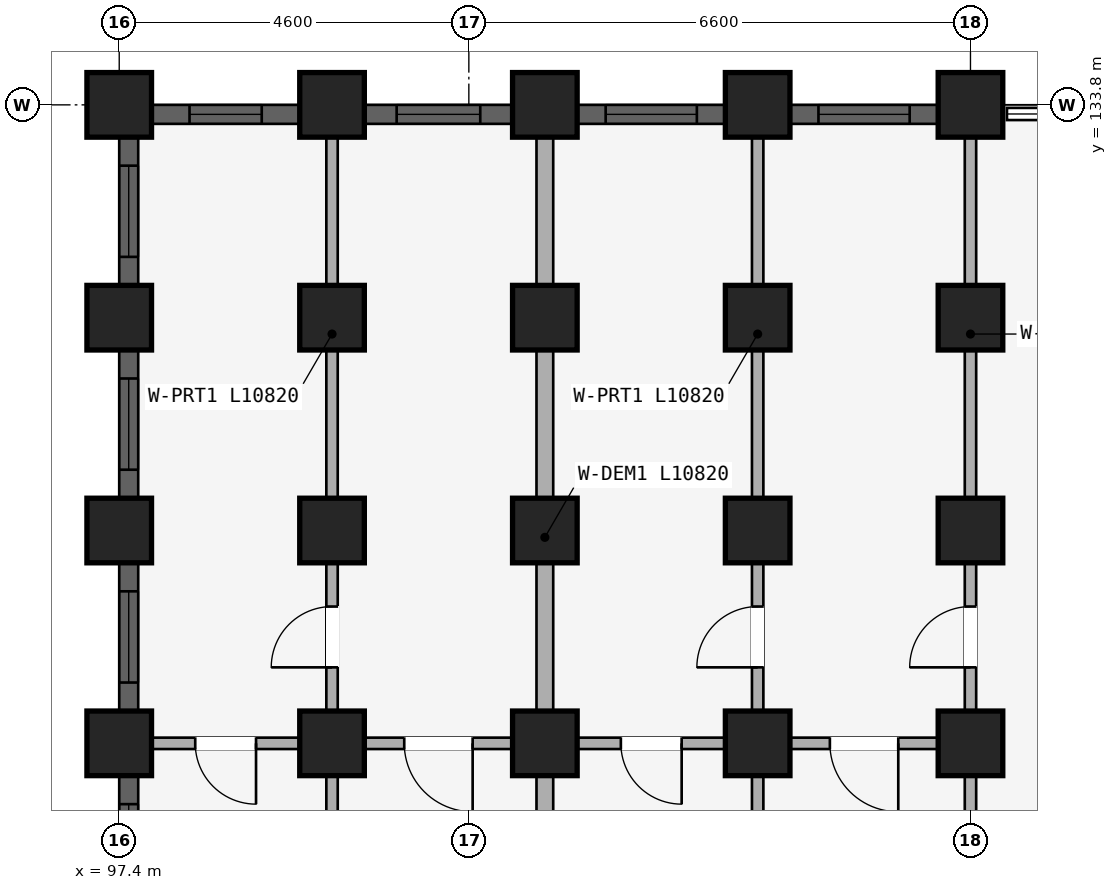
"""IFC4 building model, lengths in metres.
Left out: names, types, materials, properties, quantities, classifications, styles, units other than length and angle.
Written with IfcOpenShell. Run it as: python <this file> out.ifc"""

import sys

from ifc_helpers import new_model, si_unit, direction, frame, frame_2d, origin, origin_2d, place, context, subcontext, project, spatial, rectangle, extrude, element, fill, save


model = new_model("IFC4")
c1 = context("Model", 3, precision=1e-05, world=origin(), true_north=direction((0.0, 1.0)))
c2 = subcontext(c1, "Body", "Model", "MODEL_VIEW")
j1 = project(units=[si_unit("LENGTHUNIT", "METRE"), si_unit("PLANEANGLEUNIT", "RADIAN")], contexts=[c1])
p1 = place(None, origin())
s1 = spatial("IfcSite", under=j1, at=p1, CompositionType="ELEMENT")
p2 = place(p1, origin())
s2 = spatial("IfcBuilding", under=s1, at=p2, CompositionType="ELEMENT")
p3 = place(p2, frame((0.0, 0.0, 4.5)))
s3 = spatial("IfcBuildingStorey", under=s2, at=p3, CompositionType="ELEMENT", Elevation=4.5)
for number, where, z_axis, x_axis in (
    (1, (108.6, 125.4, 0.0), (0.0, 0.0, 1.0), (1.0, 0.0, 0.0)),
    (2, (108.6, 128.2, 0.0), (0.0, 0.0, 1.0), (1.0, 0.0, 0.0)),
    (3, (108.6, 131.0, 0.0), (0.0, 0.0, 1.0), (1.0, 0.0, 0.0)),
    (4, (108.6, 133.8, 0.0), (0.0, 0.0, 1.0), (1.0, 0.0, 0.0)),
    (5, (105.8, 125.4, 0.0), (0.0, 0.0, 1.0), (1.0, 0.0, 0.0)),
    (6, (105.8, 128.2, 0.0), (0.0, 0.0, 1.0), (1.0, 0.0, 0.0)),
    (7, (105.8, 131.0, 0.0), (0.0, 0.0, 1.0), (1.0, 0.0, 0.0)),
    (8, (105.8, 133.8, 0.0), (0.0, 0.0, 1.0), (1.0, 0.0, 0.0)),
    (9, (103.0, 125.4, 0.0), (0.0, 0.0, 1.0), (1.0, 0.0, 0.0)),
    (10, (103.0, 128.2, 0.0), (0.0, 0.0, 1.0), (1.0, 0.0, 0.0)),
    (11, (103.0, 131.0, 0.0), (0.0, 0.0, 1.0), (1.0, 0.0, 0.0)),
    (12, (103.0, 133.8, 0.0), (0.0, 0.0, 1.0), (1.0, 0.0, 0.0)),
    (13, (100.2, 125.4, 0.0), (0.0, 0.0, 1.0), (1.0, 0.0, 0.0)),
    (14, (100.2, 128.2, 0.0), (0.0, 0.0, 1.0), (1.0, 0.0, 0.0)),
    (15, (100.2, 131.0, 0.0), (0.0, 0.0, 1.0), (1.0, 0.0, 0.0)),
    (16, (100.2, 133.8, 0.0), (0.0, 0.0, 1.0), (1.0, 0.0, 0.0)),
    (17, (97.4, 125.4, 0.0), (0.0, 0.0, 1.0), (1.0, 0.0, 0.0)),
    (18, (97.4, 128.2, 0.0), (0.0, 0.0, 1.0), (1.0, 0.0, 0.0)),
    (19, (97.4, 131.0, 0.0), (0.0, 0.0, 1.0), (1.0, 0.0, 0.0)),
    (20, (97.4, 133.8, 0.0), (0.0, 0.0, 1.0), (1.0, 0.0, 0.0)),
):
    element("IfcColumn", number, at=place(p3, frame(where, z_axis=z_axis, x_axis=x_axis)), inside=s3, PredefinedType="COLUMN", context=c2, shape_type="SweptSolid", body=[
        extrude(rectangle(XDim=0.85, YDim=0.85, at=origin_2d()), origin(), (0.0, 0.0, 1.0), 3.98),
    ])
p4 = place(p3, frame((108.52, 125.4, 0.0), z_axis=(0.0, 0.0, 1.0), x_axis=(-1.0, 0.0, 0.0)))
e21 = element("IfcWall", 21, at=p4, inside=s3, PredefinedType="PLUMBINGWALL", context=c2, shape_type="SweptSolid", body=[
    extrude(rectangle(XDim=2.64, YDim=0.15, at=frame_2d((1.32, 0.0))), origin(), (0.0, 0.0, 1.0), 3.322),
])
p5 = place(p4, frame((0.87, 0.0, 0.0)))
e22 = element("IfcOpeningElement", 22, at=p5, cuts=e21, PredefinedType="OPENING", context=c2, shape_type="SweptSolid", body=[
    extrude(rectangle(XDim=0.9, YDim=2.1, at=frame_2d((0.45, 1.05))), frame((0.0, 0.085, 0.0), z_axis=(0.0, -1.0, 0.0), x_axis=(1.0, 0.0, 0.0)), (0.0, 0.0, 1.0), 0.17),
])
p6 = place(p3, frame((105.72, 125.4, 0.0), z_axis=(0.0, 0.0, 1.0), x_axis=(-1.0, 0.0, 0.0)))
e23 = element("IfcWall", 23, at=p6, inside=s3, PredefinedType="PLUMBINGWALL", context=c2, shape_type="SweptSolid", body=[
    extrude(rectangle(XDim=2.64, YDim=0.15, at=frame_2d((1.32, 0.0))), origin(), (0.0, 0.0, 1.0), 3.322),
])
p7 = place(p6, frame((0.92, 0.0, 0.0)))
e24 = element("IfcOpeningElement", 24, at=p7, cuts=e23, PredefinedType="OPENING", context=c2, shape_type="SweptSolid", body=[
    extrude(rectangle(XDim=0.8, YDim=2.1, at=frame_2d((0.4, 1.05))), frame((0.0, 0.085, 0.0), z_axis=(0.0, -1.0, 0.0), x_axis=(1.0, 0.0, 0.0)), (0.0, 0.0, 1.0), 0.17),
])
p8 = place(p3, frame((102.92, 125.4, 0.0), z_axis=(0.0, 0.0, 1.0), x_axis=(-1.0, 0.0, 0.0)))
e25 = element("IfcWall", 25, at=p8, inside=s3, PredefinedType="PLUMBINGWALL", context=c2, shape_type="SweptSolid", body=[
    extrude(rectangle(XDim=2.64, YDim=0.15, at=frame_2d((1.32, 0.0))), origin(), (0.0, 0.0, 1.0), 3.322),
])
p9 = place(p8, frame((0.87, 0.0, 0.0)))
e26 = element("IfcOpeningElement", 26, at=p9, cuts=e25, PredefinedType="OPENING", context=c2, shape_type="SweptSolid", body=[
    extrude(rectangle(XDim=0.9, YDim=2.1, at=frame_2d((0.45, 1.05))), frame((0.0, 0.085, 0.0), z_axis=(0.0, -1.0, 0.0), x_axis=(1.0, 0.0, 0.0)), (0.0, 0.0, 1.0), 0.17),
])
p10 = place(p3, frame((100.12, 125.4, 0.0), z_axis=(0.0, 0.0, 1.0), x_axis=(-1.0, 0.0, 0.0)))
e27 = element("IfcWall", 27, at=p10, inside=s3, PredefinedType="PLUMBINGWALL", context=c2, shape_type="SweptSolid", body=[
    extrude(rectangle(XDim=2.64, YDim=0.15, at=frame_2d((1.32, 0.0))), origin(), (0.0, 0.0, 1.0), 3.322),
])
p11 = place(p10, frame((0.92, 0.0, 0.0)))
e28 = element("IfcOpeningElement", 28, at=p11, cuts=e27, PredefinedType="OPENING", context=c2, shape_type="SweptSolid", body=[
    extrude(rectangle(XDim=0.8, YDim=2.1, at=frame_2d((0.4, 1.05))), frame((0.0, 0.085, 0.0), z_axis=(0.0, -1.0, 0.0), x_axis=(1.0, 0.0, 0.0)), (0.0, 0.0, 1.0), 0.17),
])
p12 = place(p3, frame((108.6, 122.7, 0.0), z_axis=(0.0, 0.0, 1.0), x_axis=(0.0, 1.0, 0.0)))
e29 = element("IfcWall", 29, at=p12, inside=s3, PredefinedType="PARTITIONING", context=c2, shape_type="SweptSolid", body=[
    extrude(rectangle(XDim=10.82, YDim=0.15, at=frame_2d((5.41, 0.0))), origin(), (0.0, 0.0, 1.0), 3.322),
])
p13 = place(p12, frame((3.7, 0.0, 0.0)))
e30 = element("IfcOpeningElement", 30, at=p13, cuts=e29, PredefinedType="OPENING", context=c2, shape_type="SweptSolid", body=[
    extrude(rectangle(XDim=0.8, YDim=2.1, at=frame_2d((0.4, 1.05))), frame((0.0, 0.085, 0.0), z_axis=(0.0, -1.0, 0.0), x_axis=(1.0, 0.0, 0.0)), (0.0, 0.0, 1.0), 0.17),
])
p14 = place(p3, frame((105.8, 122.7, 0.0), z_axis=(0.0, 0.0, 1.0), x_axis=(0.0, 1.0, 0.0)))
e31 = element("IfcWall", 31, at=p14, inside=s3, PredefinedType="PARTITIONING", context=c2, shape_type="SweptSolid", body=[
    extrude(rectangle(XDim=10.82, YDim=0.15, at=frame_2d((5.41, 0.0))), origin(), (0.0, 0.0, 1.0), 3.322),
])
p15 = place(p14, frame((3.7, 0.0, 0.0)))
e32 = element("IfcOpeningElement", 32, at=p15, cuts=e31, PredefinedType="OPENING", context=c2, shape_type="SweptSolid", body=[
    extrude(rectangle(XDim=0.8, YDim=2.1, at=frame_2d((0.4, 1.05))), frame((0.0, 0.085, 0.0), z_axis=(0.0, -1.0, 0.0), x_axis=(1.0, 0.0, 0.0)), (0.0, 0.0, 1.0), 0.17),
])
p16 = place(p3, frame((103.0, 122.7, 0.0), z_axis=(0.0, 0.0, 1.0), x_axis=(0.0, 1.0, 0.0)))
e33 = element("IfcWall", 33, at=p16, inside=s3, PredefinedType="STANDARD", context=c2, shape_type="SweptSolid", body=[
    extrude(rectangle(XDim=10.82, YDim=0.22, at=frame_2d((5.41, 0.0))), origin(), (0.0, 0.0, 1.0), 3.322),
])
p17 = place(p3, frame((100.2, 122.7, 0.0), z_axis=(0.0, 0.0, 1.0), x_axis=(0.0, 1.0, 0.0)))
e34 = element("IfcWall", 34, at=p17, inside=s3, PredefinedType="PARTITIONING", context=c2, shape_type="SweptSolid", body=[
    extrude(rectangle(XDim=10.82, YDim=0.15, at=frame_2d((5.41, 0.0))), origin(), (0.0, 0.0, 1.0), 3.322),
])
p18 = place(p17, frame((3.7, 0.0, 0.0)))
e35 = element("IfcOpeningElement", 35, at=p18, cuts=e34, PredefinedType="OPENING", context=c2, shape_type="SweptSolid", body=[
    extrude(rectangle(XDim=0.8, YDim=2.1, at=frame_2d((0.4, 1.05))), frame((0.0, 0.085, 0.0), z_axis=(0.0, -1.0, 0.0), x_axis=(1.0, 0.0, 0.0)), (0.0, 0.0, 1.0), 0.17),
])
p19 = place(p3, frame((108.171, 133.675, 0.0), z_axis=(0.0, 0.0, 1.0), x_axis=(-1.0, 0.0, 0.0)))
e36 = element("IfcWall", 36, at=p19, inside=s3, PredefinedType="STANDARD", context=c2, shape_type="SweptSolid", body=[
    extrude(rectangle(XDim=1.943, YDim=0.25, at=frame_2d((0.971, 0.0))), origin(), (0.0, 0.0, 1.0), 3.522),
])
p20 = place(p19, frame((0.372, 0.0, 0.88)))
e37 = element("IfcOpeningElement", 37, at=p20, cuts=e36, PredefinedType="OPENING", context=c2, shape_type="SweptSolid", body=[
    extrude(rectangle(XDim=1.2, YDim=1.5, at=frame_2d((0.6, 0.75))), frame((0.0, 0.135, 0.0), z_axis=(0.0, -1.0, 0.0), x_axis=(1.0, 0.0, 0.0)), (0.0, 0.0, 1.0), 0.27),
])
p21 = place(p3, frame((105.372, 133.675, 0.0), z_axis=(0.0, 0.0, 1.0), x_axis=(-1.0, 0.0, 0.0)))
e38 = element("IfcWall", 38, at=p21, inside=s3, PredefinedType="STANDARD", context=c2, shape_type="SweptSolid", body=[
    extrude(rectangle(XDim=1.943, YDim=0.25, at=frame_2d((0.972, 0.0))), origin(), (0.0, 0.0, 1.0), 3.522),
])
p22 = place(p21, frame((0.372, 0.0, 0.88)))
e39 = element("IfcOpeningElement", 39, at=p22, cuts=e38, PredefinedType="OPENING", context=c2, shape_type="SweptSolid", body=[
    extrude(rectangle(XDim=1.2, YDim=1.5, at=frame_2d((0.6, 0.75))), frame((0.0, 0.135, 0.0), z_axis=(0.0, -1.0, 0.0), x_axis=(1.0, 0.0, 0.0)), (0.0, 0.0, 1.0), 0.27),
])
p23 = place(p3, frame((102.572, 133.675, 0.0), z_axis=(0.0, 0.0, 1.0), x_axis=(-1.0, 0.0, 0.0)))
e40 = element("IfcWall", 40, at=p23, inside=s3, PredefinedType="STANDARD", context=c2, shape_type="SweptSolid", body=[
    extrude(rectangle(XDim=1.943, YDim=0.25, at=frame_2d((0.972, 0.0))), origin(), (0.0, 0.0, 1.0), 3.522),
])
p24 = place(p23, frame((0.421, 0.0, 0.88)))
e41 = element("IfcOpeningElement", 41, at=p24, cuts=e40, PredefinedType="OPENING", context=c2, shape_type="SweptSolid", body=[
    extrude(rectangle(XDim=1.1, YDim=1.45, at=frame_2d((0.55, 0.725))), frame((0.0, 0.135, 0.0), z_axis=(0.0, -1.0, 0.0), x_axis=(1.0, 0.0, 0.0)), (0.0, 0.0, 1.0), 0.27),
])
p25 = place(p3, frame((99.771, 133.675, 0.0), z_axis=(0.0, 0.0, 1.0), x_axis=(-1.0, 0.0, 0.0)))
e42 = element("IfcWall", 42, at=p25, inside=s3, PredefinedType="STANDARD", context=c2, shape_type="SweptSolid", body=[
    extrude(rectangle(XDim=1.943, YDim=0.25, at=frame_2d((0.971, 0.0))), origin(), (0.0, 0.0, 1.0), 3.522),
])
p26 = place(p25, frame((0.497, 0.0, 0.88)))
e43 = element("IfcOpeningElement", 43, at=p26, cuts=e42, PredefinedType="OPENING", context=c2, shape_type="SweptSolid", body=[
    extrude(rectangle(XDim=0.95, YDim=1.35, at=frame_2d((0.475, 0.675))), frame((0.0, 0.135, 0.0), z_axis=(0.0, -1.0, 0.0), x_axis=(1.0, 0.0, 0.0)), (0.0, 0.0, 1.0), 0.27),
])
p27 = place(p3, frame((97.525, 123.02, 0.0), z_axis=(0.0, 0.0, 1.0), x_axis=(0.0, 1.0, 0.0)))
e44 = element("IfcWall", 44, at=p27, inside=s3, PredefinedType="STANDARD", context=c2, shape_type="SweptSolid", body=[
    extrude(rectangle(XDim=1.96, YDim=0.25, at=frame_2d((0.98, 0.0))), origin(), (0.0, 0.0, 1.0), 3.322),
])
p28 = place(p27, frame((0.38, 0.0, 0.88)))
e45 = element("IfcOpeningElement", 45, at=p28, cuts=e44, PredefinedType="OPENING", context=c2, shape_type="SweptSolid", body=[
    extrude(rectangle(XDim=1.2, YDim=1.5, at=frame_2d((0.6, 0.75))), frame((0.0, 0.135, 0.0), z_axis=(0.0, -1.0, 0.0), x_axis=(1.0, 0.0, 0.0)), (0.0, 0.0, 1.0), 0.27),
])
p29 = place(p3, frame((97.525, 125.82, 0.0), z_axis=(0.0, 0.0, 1.0), x_axis=(0.0, 1.0, 0.0)))
e46 = element("IfcWall", 46, at=p29, inside=s3, PredefinedType="STANDARD", context=c2, shape_type="SweptSolid", body=[
    extrude(rectangle(XDim=1.96, YDim=0.25, at=frame_2d((0.98, 0.0))), origin(), (0.0, 0.0, 1.0), 3.322),
])
p30 = place(p29, frame((0.38, 0.0, 0.88)))
e47 = element("IfcOpeningElement", 47, at=p30, cuts=e46, PredefinedType="OPENING", context=c2, shape_type="SweptSolid", body=[
    extrude(rectangle(XDim=1.2, YDim=1.5, at=frame_2d((0.6, 0.75))), frame((0.0, 0.135, 0.0), z_axis=(0.0, -1.0, 0.0), x_axis=(1.0, 0.0, 0.0)), (0.0, 0.0, 1.0), 0.27),
])
p31 = place(p3, frame((97.525, 128.62, 0.0), z_axis=(0.0, 0.0, 1.0), x_axis=(0.0, 1.0, 0.0)))
e48 = element("IfcWall", 48, at=p31, inside=s3, PredefinedType="STANDARD", context=c2, shape_type="SweptSolid", body=[
    extrude(rectangle(XDim=1.96, YDim=0.25, at=frame_2d((0.98, 0.0))), origin(), (0.0, 0.0, 1.0), 3.322),
])
p32 = place(p31, frame((0.38, 0.0, 0.88)))
e49 = element("IfcOpeningElement", 49, at=p32, cuts=e48, PredefinedType="OPENING", context=c2, shape_type="SweptSolid", body=[
    extrude(rectangle(XDim=1.2, YDim=1.5, at=frame_2d((0.6, 0.75))), frame((0.0, 0.135, 0.0), z_axis=(0.0, -1.0, 0.0), x_axis=(1.0, 0.0, 0.0)), (0.0, 0.0, 1.0), 0.27),
])
p33 = place(p3, frame((97.525, 131.42, 0.0), z_axis=(0.0, 0.0, 1.0), x_axis=(0.0, 1.0, 0.0)))
e50 = element("IfcWall", 50, at=p33, inside=s3, PredefinedType="STANDARD", context=c2, shape_type="SweptSolid", body=[
    extrude(rectangle(XDim=1.96, YDim=0.25, at=frame_2d((0.98, 0.0))), origin(), (0.0, 0.0, 1.0), 3.322),
])
p34 = place(p33, frame((0.38, 0.0, 0.88)))
e51 = element("IfcOpeningElement", 51, at=p34, cuts=e50, PredefinedType="OPENING", context=c2, shape_type="SweptSolid", body=[
    extrude(rectangle(XDim=1.2, YDim=1.5, at=frame_2d((0.6, 0.75))), frame((0.0, 0.135, 0.0), z_axis=(0.0, -1.0, 0.0), x_axis=(1.0, 0.0, 0.0)), (0.0, 0.0, 1.0), 0.27),
])
p35 = place(p20, origin())
e52 = element("IfcWindow", 52, at=p35, inside=s3, PartitioningType="SINGLE_PANEL", PredefinedType="WINDOW", context=c2, shape_type="SweptSolid", body=[
    extrude(rectangle(XDim=1.2, YDim=1.5, at=frame_2d((0.6, 0.75))), frame((0.0, 0.03, 0.0), z_axis=(0.0, -1.0, 0.0), x_axis=(1.0, 0.0, 0.0)), (0.0, 0.0, 1.0), 0.06),
])
fill(e37, e52)
p36 = place(p22, origin())
e53 = element("IfcWindow", 53, at=p36, inside=s3, PartitioningType="SINGLE_PANEL", PredefinedType="WINDOW", context=c2, shape_type="SweptSolid", body=[
    extrude(rectangle(XDim=1.2, YDim=1.5, at=frame_2d((0.6, 0.75))), frame((0.0, 0.03, 0.0), z_axis=(0.0, -1.0, 0.0), x_axis=(1.0, 0.0, 0.0)), (0.0, 0.0, 1.0), 0.06),
])
fill(e39, e53)
p37 = place(p24, origin())
e54 = element("IfcWindow", 54, at=p37, inside=s3, PartitioningType="SINGLE_PANEL", PredefinedType="WINDOW", context=c2, shape_type="SweptSolid", body=[
    extrude(rectangle(XDim=1.1, YDim=1.45, at=frame_2d((0.55, 0.725))), frame((0.0, 0.03, 0.0), z_axis=(0.0, -1.0, 0.0), x_axis=(1.0, 0.0, 0.0)), (0.0, 0.0, 1.0), 0.06),
])
fill(e41, e54)
p38 = place(p26, origin())
e55 = element("IfcWindow", 55, at=p38, inside=s3, PartitioningType="SINGLE_PANEL", PredefinedType="WINDOW", context=c2, shape_type="SweptSolid", body=[
    extrude(rectangle(XDim=0.95, YDim=1.35, at=frame_2d((0.475, 0.675))), frame((0.0, 0.03, 0.0), z_axis=(0.0, -1.0, 0.0), x_axis=(1.0, 0.0, 0.0)), (0.0, 0.0, 1.0), 0.06),
])
fill(e43, e55)
p39 = place(p28, origin())
e56 = element("IfcWindow", 56, at=p39, inside=s3, PartitioningType="SINGLE_PANEL", PredefinedType="WINDOW", context=c2, shape_type="SweptSolid", body=[
    extrude(rectangle(XDim=1.2, YDim=1.5, at=frame_2d((0.6, 0.75))), frame((0.0, 0.03, 0.0), z_axis=(0.0, -1.0, 0.0), x_axis=(1.0, 0.0, 0.0)), (0.0, 0.0, 1.0), 0.06),
])
fill(e45, e56)
p40 = place(p30, origin())
e57 = element("IfcWindow", 57, at=p40, inside=s3, PartitioningType="SINGLE_PANEL", PredefinedType="WINDOW", context=c2, shape_type="SweptSolid", body=[
    extrude(rectangle(XDim=1.2, YDim=1.5, at=frame_2d((0.6, 0.75))), frame((0.0, 0.03, 0.0), z_axis=(0.0, -1.0, 0.0), x_axis=(1.0, 0.0, 0.0)), (0.0, 0.0, 1.0), 0.06),
])
fill(e47, e57)
p41 = place(p32, origin())
e58 = element("IfcWindow", 58, at=p41, inside=s3, PartitioningType="SINGLE_PANEL", PredefinedType="WINDOW", context=c2, shape_type="SweptSolid", body=[
    extrude(rectangle(XDim=1.2, YDim=1.5, at=frame_2d((0.6, 0.75))), frame((0.0, 0.03, 0.0), z_axis=(0.0, -1.0, 0.0), x_axis=(1.0, 0.0, 0.0)), (0.0, 0.0, 1.0), 0.06),
])
fill(e49, e58)
p42 = place(p34, origin())
e59 = element("IfcWindow", 59, at=p42, inside=s3, PartitioningType="SINGLE_PANEL", PredefinedType="WINDOW", context=c2, shape_type="SweptSolid", body=[
    extrude(rectangle(XDim=1.2, YDim=1.5, at=frame_2d((0.6, 0.75))), frame((0.0, 0.03, 0.0), z_axis=(0.0, -1.0, 0.0), x_axis=(1.0, 0.0, 0.0)), (0.0, 0.0, 1.0), 0.06),
])
fill(e51, e59)
p43 = place(p5, origin())
e60 = element("IfcDoor", 60, at=p43, inside=s3, OperationType="SINGLE_SWING_LEFT", PredefinedType="DOOR", context=c2, shape_type="SweptSolid", body=[
    extrude(rectangle(XDim=0.9, YDim=2.1, at=frame_2d((0.45, 1.05))), frame((0.0, 0.025, 0.0), z_axis=(0.0, -1.0, 0.0), x_axis=(1.0, 0.0, 0.0)), (0.0, 0.0, 1.0), 0.05),
])
fill(e22, e60)
p44 = place(p7, origin())
e61 = element("IfcDoor", 61, at=p44, inside=s3, OperationType="SINGLE_SWING_LEFT", PredefinedType="DOOR", context=c2, shape_type="SweptSolid", body=[
    extrude(rectangle(XDim=0.8, YDim=2.1, at=frame_2d((0.4, 1.05))), frame((0.0, 0.025, 0.0), z_axis=(0.0, -1.0, 0.0), x_axis=(1.0, 0.0, 0.0)), (0.0, 0.0, 1.0), 0.05),
])
fill(e24, e61)
p45 = place(p9, origin())
e62 = element("IfcDoor", 62, at=p45, inside=s3, OperationType="SINGLE_SWING_LEFT", PredefinedType="DOOR", context=c2, shape_type="SweptSolid", body=[
    extrude(rectangle(XDim=0.9, YDim=2.1, at=frame_2d((0.45, 1.05))), frame((0.0, 0.025, 0.0), z_axis=(0.0, -1.0, 0.0), x_axis=(1.0, 0.0, 0.0)), (0.0, 0.0, 1.0), 0.05),
])
fill(e26, e62)
p46 = place(p11, origin())
e63 = element("IfcDoor", 63, at=p46, inside=s3, OperationType="SINGLE_SWING_LEFT", PredefinedType="DOOR", context=c2, shape_type="SweptSolid", body=[
    extrude(rectangle(XDim=0.8, YDim=2.1, at=frame_2d((0.4, 1.05))), frame((0.0, 0.025, 0.0), z_axis=(0.0, -1.0, 0.0), x_axis=(1.0, 0.0, 0.0)), (0.0, 0.0, 1.0), 0.05),
])
fill(e28, e63)
p47 = place(p13, frame((0.8, 0.0, 0.0), z_axis=(0.0, 0.0, 1.0), x_axis=(-1.0, 0.0, 0.0)))
e64 = element("IfcDoor", 64, at=p47, inside=s3, OperationType="SINGLE_SWING_RIGHT", PredefinedType="DOOR", context=c2, shape_type="SweptSolid", body=[
    extrude(rectangle(XDim=0.8, YDim=2.1, at=frame_2d((0.4, 1.05))), frame((0.0, 0.025, 0.0), z_axis=(0.0, -1.0, 0.0), x_axis=(1.0, 0.0, 0.0)), (0.0, 0.0, 1.0), 0.05),
])
fill(e30, e64)
p48 = place(p15, origin())
e65 = element("IfcDoor", 65, at=p48, inside=s3, OperationType="SINGLE_SWING_LEFT", PredefinedType="DOOR", context=c2, shape_type="SweptSolid", body=[
    extrude(rectangle(XDim=0.8, YDim=2.1, at=frame_2d((0.4, 1.05))), frame((0.0, 0.025, 0.0), z_axis=(0.0, -1.0, 0.0), x_axis=(1.0, 0.0, 0.0)), (0.0, 0.0, 1.0), 0.05),
])
fill(e32, e65)
p49 = place(p18, frame((0.8, 0.0, 0.0), z_axis=(0.0, 0.0, 1.0), x_axis=(-1.0, 0.0, 0.0)))
e66 = element("IfcDoor", 66, at=p49, inside=s3, OperationType="SINGLE_SWING_RIGHT", PredefinedType="DOOR", context=c2, shape_type="SweptSolid", body=[
    extrude(rectangle(XDim=0.8, YDim=2.1, at=frame_2d((0.4, 1.05))), frame((0.0, 0.025, 0.0), z_axis=(0.0, -1.0, 0.0), x_axis=(1.0, 0.0, 0.0)), (0.0, 0.0, 1.0), 0.05),
])
fill(e35, e66)
save(model, sys.argv[1])
